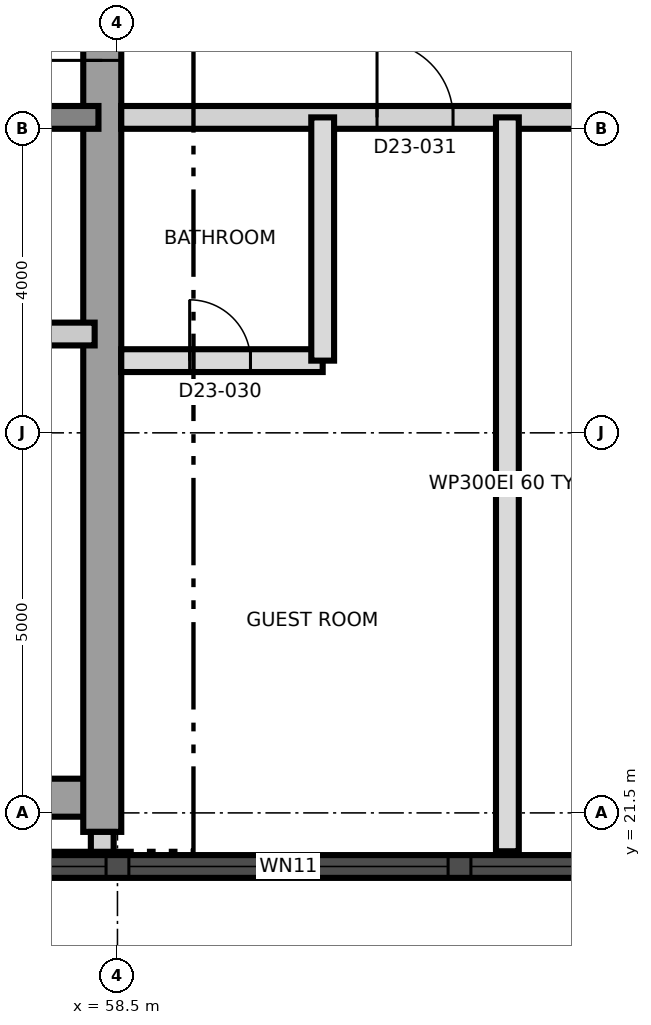
"""IFC4 building model, lengths in metres.
Left out: names, types, materials, properties, quantities, classifications, styles, units other than length and angle.
Written with IfcOpenShell. Run it as: python <this file> out.ifc"""

import sys

from ifc_helpers import new_model, si_unit, direction, frame, frame_2d, origin, place, context, subcontext, project, spatial, rectangle, extrude, element, fill, save


model = new_model("IFC4")
c1 = context("Model", 3, precision=1e-05, world=origin(), true_north=direction((0.0, 1.0)))
c2 = subcontext(c1, "Body", "Model", "MODEL_VIEW")
j1 = project(units=[si_unit("LENGTHUNIT", "METRE"), si_unit("PLANEANGLEUNIT", "RADIAN")], contexts=[c1])
p1 = place(None, origin())
s1 = spatial("IfcSite", under=j1, at=p1, CompositionType="ELEMENT")
p2 = place(p1, origin())
s2 = spatial("IfcBuilding", under=s1, at=p2, CompositionType="ELEMENT")
p3 = place(p2, frame((0.0, 0.0, 206.9)))
s3 = spatial("IfcBuildingStorey", under=s2, at=p3, CompositionType="ELEMENT", Elevation=206.9)
p4 = place(p3, frame((31.25, 21.7, 0.0), z_axis=(0.0, 0.0, 1.0), x_axis=(1.0, 0.0, 0.0)))
e1 = element("IfcWall", 1, at=p4, inside=s3, PredefinedType="SHEAR", context=c2, shape_type="SweptSolid", body=[
    extrude(rectangle(XDim=27.0, YDim=0.5, at=frame_2d((13.5, 0.0))), origin(), (0.0, 0.0, 1.0), 3.7),
])
p5 = place(p3, frame((58.3, 21.25, 0.0), z_axis=(0.0, 0.0, 1.0), x_axis=(0.0, 1.0, 0.0)))
e2 = element("IfcWall", 2, at=p5, inside=s3, PredefinedType="SHEAR", context=c2, shape_type="SweptSolid", body=[
    extrude(rectangle(XDim=18.5, YDim=0.5, at=frame_2d((9.25, 0.0))), origin(), (0.0, 0.0, 1.0), 3.7),
])
p6 = place(p5, frame((10.15, 0.0, 0.0)))
e3 = element("IfcOpeningElement", 3, at=p6, cuts=e2, PredefinedType="OPENING", context=c2, shape_type="SweptSolid", body=[
    extrude(rectangle(XDim=1.2, YDim=2.1, at=frame_2d((0.6, 1.05))), frame((0.0, 0.26, 0.0), z_axis=(0.0, -1.0, 0.0), x_axis=(1.0, 0.0, 0.0)), (0.0, 0.0, 1.0), 0.52),
])
p7 = place(p3, frame((31.75, 30.65, 0.0), z_axis=(0.0, 0.0, 1.0), x_axis=(1.0, 0.0, 0.0)))
e4 = element("IfcWall", 4, at=p7, inside=s3, PredefinedType="SHEAR", context=c2, shape_type="SweptSolid", body=[
    extrude(rectangle(XDim=26.5, YDim=0.3, at=frame_2d((13.25, 0.0))), origin(), (0.0, 0.0, 1.0), 3.7),
])
p8 = place(p7, frame((24.75, 0.0, 0.0)))
e5 = element("IfcOpeningElement", 5, at=p8, cuts=e4, PredefinedType="OPENING", context=c2, shape_type="SweptSolid", body=[
    extrude(rectangle(XDim=1.0, YDim=2.1, at=frame_2d((0.5, 1.05))), frame((0.0, 0.16, 0.0), z_axis=(0.0, -1.0, 0.0), x_axis=(1.0, 0.0, 0.0)), (0.0, 0.0, 1.0), 0.32),
])
p9 = place(p3, frame((44.011, 20.795, 0.0), z_axis=(0.0, 0.0, 1.0), x_axis=(1.0, 0.0, 0.0)))
e6 = element("IfcWall", 6, at=p9, inside=s3, PredefinedType="SOLIDWALL", context=c2, shape_type="SweptSolid", body=[
    extrude(rectangle(XDim=43.476, YDim=0.3, at=frame_2d((21.738, 0.0))), origin(), (0.0, 0.0, 1.0), 3.4),
])
p10 = place(p9, frame((1.845, 0.0, 0.3)))
e7 = element("IfcOpeningElement", 7, at=p10, cuts=e6, PredefinedType="OPENING", context=c2, shape_type="SweptSolid", body=[
    extrude(rectangle(XDim=1.8, YDim=2.4, at=frame_2d((0.9, 1.2))), frame((0.0, 0.16, 0.0), z_axis=(0.0, -1.0, 0.0), x_axis=(1.0, 0.0, 0.0)), (0.0, 0.0, 1.0), 0.32),
])
p11 = place(p9, frame((5.639, 0.0, 0.9)))
e8 = element("IfcOpeningElement", 8, at=p11, cuts=e6, PredefinedType="OPENING", context=c2, shape_type="SweptSolid", body=[
    extrude(rectangle(XDim=4.2, YDim=1.5, at=frame_2d((2.1, 0.75))), frame((0.0, 0.16, 0.0), z_axis=(0.0, -1.0, 0.0), x_axis=(1.0, 0.0, 0.0)), (0.0, 0.0, 1.0), 0.32),
])
p12 = place(p9, frame((10.139, 0.0, 0.9)))
e9 = element("IfcOpeningElement", 9, at=p12, cuts=e6, PredefinedType="OPENING", context=c2, shape_type="SweptSolid", body=[
    extrude(rectangle(XDim=4.2, YDim=1.5, at=frame_2d((2.1, 0.75))), frame((0.0, 0.16, 0.0), z_axis=(0.0, -1.0, 0.0), x_axis=(1.0, 0.0, 0.0)), (0.0, 0.0, 1.0), 0.32),
])
p13 = place(p9, frame((14.639, 0.0, 0.9)))
e10 = element("IfcOpeningElement", 10, at=p13, cuts=e6, PredefinedType="OPENING", context=c2, shape_type="SweptSolid", body=[
    extrude(rectangle(XDim=4.2, YDim=1.5, at=frame_2d((2.1, 0.75))), frame((0.0, 0.16, 0.0), z_axis=(0.0, -1.0, 0.0), x_axis=(1.0, 0.0, 0.0)), (0.0, 0.0, 1.0), 0.32),
])
p14 = place(p9, frame((19.139, 0.0, 0.9)))
e11 = element("IfcOpeningElement", 11, at=p14, cuts=e6, PredefinedType="OPENING", context=c2, shape_type="SweptSolid", body=[
    extrude(rectangle(XDim=4.2, YDim=1.5, at=frame_2d((2.1, 0.75))), frame((0.0, 0.16, 0.0), z_axis=(0.0, -1.0, 0.0), x_axis=(1.0, 0.0, 0.0)), (0.0, 0.0, 1.0), 0.32),
])
p15 = place(p9, frame((23.639, 0.0, 0.9)))
e12 = element("IfcOpeningElement", 12, at=p15, cuts=e6, PredefinedType="OPENING", context=c2, shape_type="SweptSolid", body=[
    extrude(rectangle(XDim=4.2, YDim=1.5, at=frame_2d((2.1, 0.75))), frame((0.0, 0.16, 0.0), z_axis=(0.0, -1.0, 0.0), x_axis=(1.0, 0.0, 0.0)), (0.0, 0.0, 1.0), 0.32),
])
p16 = place(p9, frame((28.139, 0.0, 0.9)))
e13 = element("IfcOpeningElement", 13, at=p16, cuts=e6, PredefinedType="OPENING", context=c2, shape_type="SweptSolid", body=[
    extrude(rectangle(XDim=4.2, YDim=1.5, at=frame_2d((2.1, 0.75))), frame((0.0, 0.16, 0.0), z_axis=(0.0, -1.0, 0.0), x_axis=(1.0, 0.0, 0.0)), (0.0, 0.0, 1.0), 0.32),
])
p17 = place(p9, frame((32.639, 0.0, 0.9)))
e14 = element("IfcOpeningElement", 14, at=p17, cuts=e6, PredefinedType="OPENING", context=c2, shape_type="SweptSolid", body=[
    extrude(rectangle(XDim=4.2, YDim=1.5, at=frame_2d((2.1, 0.75))), frame((0.0, 0.16, 0.0), z_axis=(0.0, -1.0, 0.0), x_axis=(1.0, 0.0, 0.0)), (0.0, 0.0, 1.0), 0.32),
])
p18 = place(p9, frame((37.139, 0.0, 0.9)))
e15 = element("IfcOpeningElement", 15, at=p18, cuts=e6, PredefinedType="OPENING", context=c2, shape_type="SweptSolid", body=[
    extrude(rectangle(XDim=4.2, YDim=1.5, at=frame_2d((2.1, 0.75))), frame((0.0, 0.16, 0.0), z_axis=(0.0, -1.0, 0.0), x_axis=(1.0, 0.0, 0.0)), (0.0, 0.0, 1.0), 0.32),
])
p19 = place(p3, frame((55.8, 27.8, 0.0), z_axis=(0.0, 0.0, 1.0), x_axis=(1.0, 0.0, 0.0)))
e16 = element("IfcWall", 16, at=p19, inside=s3, PredefinedType="PARTITIONING", context=c2, shape_type="SweptSolid", body=[
    extrude(rectangle(XDim=2.4, YDim=0.3, at=frame_2d((1.2, 0.0))), origin(), (0.0, 0.0, 1.0), 3.4),
])
p20 = place(p19, frame((0.75, 0.0, 0.0)))
e17 = element("IfcOpeningElement", 17, at=p20, cuts=e16, PredefinedType="OPENING", context=c2, shape_type="SweptSolid", body=[
    extrude(rectangle(XDim=0.9, YDim=2.1, at=frame_2d((0.45, 1.05))), frame((0.0, 0.16, 0.0), z_axis=(0.0, -1.0, 0.0), x_axis=(1.0, 0.0, 0.0)), (0.0, 0.0, 1.0), 0.32),
])
p21 = place(p3, frame((58.55, 27.45, 0.0), z_axis=(0.0, 0.0, 1.0), x_axis=(1.0, 0.0, 0.0)))
e18 = element("IfcWall", 18, at=p21, inside=s3, PredefinedType="PARTITIONING", context=c2, shape_type="SweptSolid", body=[
    extrude(rectangle(XDim=2.65, YDim=0.3, at=frame_2d((1.325, 0.0))), origin(), (0.0, 0.0, 1.0), 3.4),
])
p22 = place(p21, frame((0.9, 0.0, 0.0)))
e19 = element("IfcOpeningElement", 19, at=p22, cuts=e18, PredefinedType="OPENING", context=c2, shape_type="SweptSolid", body=[
    extrude(rectangle(XDim=0.8, YDim=2.1, at=frame_2d((0.4, 1.05))), frame((0.0, 0.16, 0.0), z_axis=(0.0, -1.0, 0.0), x_axis=(1.0, 0.0, 0.0)), (0.0, 0.0, 1.0), 0.32),
])
p23 = place(p3, frame((58.55, 30.65, 0.0), z_axis=(0.0, 0.0, 1.0), x_axis=(1.0, 0.0, 0.0)))
e20 = element("IfcWall", 20, at=p23, inside=s3, PredefinedType="PARTITIONING", context=c2, shape_type="SweptSolid", body=[
    extrude(rectangle(XDim=26.78, YDim=0.3, at=frame_2d((13.39, 0.0))), origin(), (0.0, 0.0, 1.0), 3.4),
])
p24 = place(p23, frame((3.365, 0.0, 0.0)))
e21 = element("IfcOpeningElement", 21, at=p24, cuts=e20, PredefinedType="OPENING", context=c2, shape_type="SweptSolid", body=[
    extrude(rectangle(XDim=1.0, YDim=2.1, at=frame_2d((0.5, 1.05))), frame((0.0, 0.16, 0.0), z_axis=(0.0, -1.0, 0.0), x_axis=(1.0, 0.0, 0.0)), (0.0, 0.0, 1.0), 0.32),
])
p25 = place(p23, frame((6.315, 0.0, 0.0)))
e22 = element("IfcOpeningElement", 22, at=p25, cuts=e20, PredefinedType="OPENING", context=c2, shape_type="SweptSolid", body=[
    extrude(rectangle(XDim=1.4, YDim=2.1, at=frame_2d((0.7, 1.05))), frame((0.0, 0.16, 0.0), z_axis=(0.0, -1.0, 0.0), x_axis=(1.0, 0.0, 0.0)), (0.0, 0.0, 1.0), 0.32),
])
p26 = place(p23, frame((10.1, 0.0, 0.0)))
e23 = element("IfcOpeningElement", 23, at=p26, cuts=e20, PredefinedType="OPENING", context=c2, shape_type="SweptSolid", body=[
    extrude(rectangle(XDim=1.0, YDim=2.1, at=frame_2d((0.5, 1.05))), frame((0.0, 0.16, 0.0), z_axis=(0.0, -1.0, 0.0), x_axis=(1.0, 0.0, 0.0)), (0.0, 0.0, 1.0), 0.32),
])
p27 = place(p23, frame((15.95, 0.0, 0.0)))
e24 = element("IfcOpeningElement", 24, at=p27, cuts=e20, PredefinedType="OPENING", context=c2, shape_type="SweptSolid", body=[
    extrude(rectangle(XDim=1.0, YDim=2.1, at=frame_2d((0.5, 1.05))), frame((0.0, 0.16, 0.0), z_axis=(0.0, -1.0, 0.0), x_axis=(1.0, 0.0, 0.0)), (0.0, 0.0, 1.0), 0.32),
])
p28 = place(p23, frame((19.1, 0.0, 0.0)))
e25 = element("IfcOpeningElement", 25, at=p28, cuts=e20, PredefinedType="OPENING", context=c2, shape_type="SweptSolid", body=[
    extrude(rectangle(XDim=1.0, YDim=2.1, at=frame_2d((0.5, 1.05))), frame((0.0, 0.16, 0.0), z_axis=(0.0, -1.0, 0.0), x_axis=(1.0, 0.0, 0.0)), (0.0, 0.0, 1.0), 0.32),
])
p29 = place(p23, frame((24.95, 0.0, 0.0)))
e26 = element("IfcOpeningElement", 26, at=p29, cuts=e20, PredefinedType="OPENING", context=c2, shape_type="SweptSolid", body=[
    extrude(rectangle(XDim=1.0, YDim=2.1, at=frame_2d((0.5, 1.05))), frame((0.0, 0.16, 0.0), z_axis=(0.0, -1.0, 0.0), x_axis=(1.0, 0.0, 0.0)), (0.0, 0.0, 1.0), 0.32),
])
p30 = place(p3, frame((61.2, 27.45, 0.0), z_axis=(0.0, 0.0, 1.0), x_axis=(0.0, 1.0, 0.0)))
e27 = element("IfcWall", 27, at=p30, inside=s3, PredefinedType="PARTITIONING", context=c2, shape_type="SweptSolid", body=[
    extrude(rectangle(XDim=3.2, YDim=0.3, at=frame_2d((1.6, 0.0))), origin(), (0.0, 0.0, 1.0), 3.4),
])
p31 = place(p3, frame((63.63, 20.995, 0.0), z_axis=(0.0, 0.0, 1.0), x_axis=(0.0, 1.0, 0.0)))
e28 = element("IfcWall", 28, at=p31, inside=s3, PredefinedType="PARTITIONING", context=c2, shape_type="SweptSolid", body=[
    extrude(rectangle(XDim=9.655, YDim=0.3, at=frame_2d((4.827, 0.0))), origin(), (0.0, 0.0, 1.0), 3.4),
])
p32 = place(p3, frame((58.3, 21.25, 0.0), z_axis=(0.0, 0.0, 1.0), x_axis=(0.0, -1.0, 0.0)))
e29 = element("IfcWall", 29, at=p32, inside=s3, PredefinedType="PARTITIONING", context=c2, shape_type="SweptSolid", body=[
    extrude(rectangle(XDim=0.295, YDim=0.3, at=frame_2d((0.147, 0.0))), origin(), (0.0, 0.0, 1.0), 3.4),
])
p33 = place(p12, origin())
e30 = element("IfcWindow", 30, at=p33, inside=s3, PartitioningType="SINGLE_PANEL", PredefinedType="WINDOW", context=c2, shape_type="SweptSolid", body=[
    extrude(rectangle(XDim=4.2, YDim=1.5, at=frame_2d((2.1, 0.75))), frame((0.0, 0.03, 0.0), z_axis=(0.0, -1.0, 0.0), x_axis=(1.0, 0.0, 0.0)), (0.0, 0.0, 1.0), 0.06),
])
fill(e9, e30)
p34 = place(p13, origin())
e31 = element("IfcWindow", 31, at=p34, inside=s3, PartitioningType="SINGLE_PANEL", PredefinedType="WINDOW", context=c2, shape_type="SweptSolid", body=[
    extrude(rectangle(XDim=4.2, YDim=1.5, at=frame_2d((2.1, 0.75))), frame((0.0, 0.03, 0.0), z_axis=(0.0, -1.0, 0.0), x_axis=(1.0, 0.0, 0.0)), (0.0, 0.0, 1.0), 0.06),
])
fill(e10, e31)
p35 = place(p14, origin())
e32 = element("IfcWindow", 32, at=p35, inside=s3, PartitioningType="SINGLE_PANEL", PredefinedType="WINDOW", context=c2, shape_type="SweptSolid", body=[
    extrude(rectangle(XDim=4.2, YDim=1.5, at=frame_2d((2.1, 0.75))), frame((0.0, 0.03, 0.0), z_axis=(0.0, -1.0, 0.0), x_axis=(1.0, 0.0, 0.0)), (0.0, 0.0, 1.0), 0.06),
])
fill(e11, e32)
p36 = place(p6, origin())
e33 = element("IfcDoor", 33, at=p36, inside=s3, OperationType="SINGLE_SWING_LEFT", PredefinedType="DOOR", context=c2, shape_type="SweptSolid", body=[
    extrude(rectangle(XDim=1.2, YDim=2.1, at=frame_2d((0.6, 1.05))), frame((0.0, 0.025, 0.0), z_axis=(0.0, -1.0, 0.0), x_axis=(1.0, 0.0, 0.0)), (0.0, 0.0, 1.0), 0.05),
])
fill(e3, e33)
p37 = place(p22, origin())
e34 = element("IfcDoor", 34, at=p37, inside=s3, OperationType="SINGLE_SWING_LEFT", PredefinedType="DOOR", context=c2, shape_type="SweptSolid", body=[
    extrude(rectangle(XDim=0.8, YDim=2.1, at=frame_2d((0.4, 1.05))), frame((0.0, 0.025, 0.0), z_axis=(0.0, -1.0, 0.0), x_axis=(1.0, 0.0, 0.0)), (0.0, 0.0, 1.0), 0.05),
])
fill(e19, e34)
p38 = place(p24, origin())
e35 = element("IfcDoor", 35, at=p38, inside=s3, OperationType="SINGLE_SWING_LEFT", PredefinedType="DOOR", context=c2, shape_type="SweptSolid", body=[
    extrude(rectangle(XDim=1.0, YDim=2.1, at=frame_2d((0.5, 1.05))), frame((0.0, 0.025, 0.0), z_axis=(0.0, -1.0, 0.0), x_axis=(1.0, 0.0, 0.0)), (0.0, 0.0, 1.0), 0.05),
])
fill(e21, e35)
save(model, sys.argv[1])
